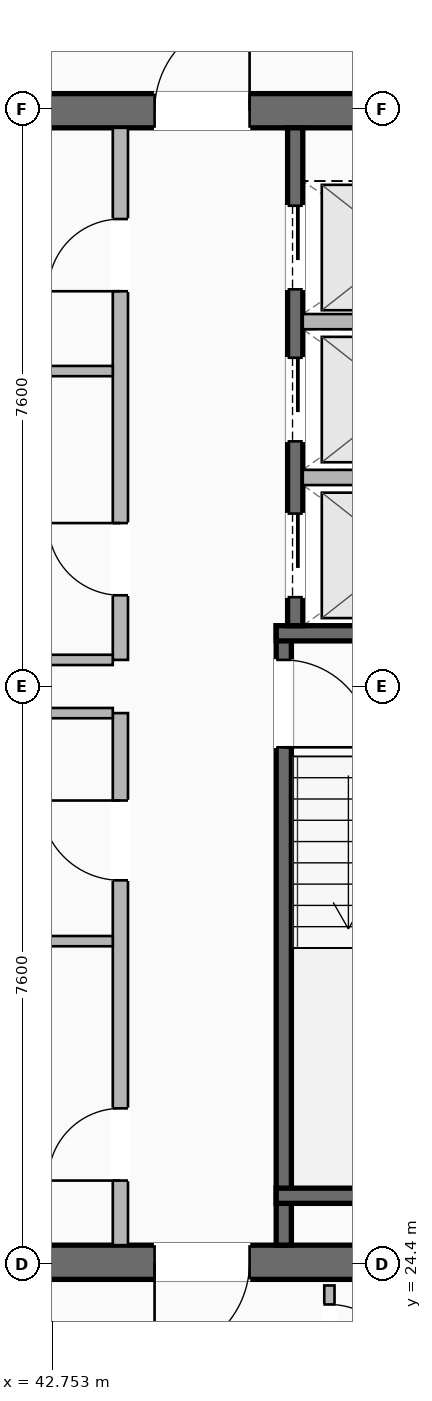
"""IFC4 building model, lengths in metres.
Left out: names, types, materials, properties, quantities, classifications, styles, units other than length and angle.
Written with IfcOpenShell. Run it as: python <this file> out.ifc"""

import sys

from ifc_helpers import new_model, si_unit, direction, frame, frame_2d, origin, place, context, subcontext, project, spatial, rectangle, extrude, element, fill, save


model = new_model("IFC4")
c1 = context("Model", 3, precision=1e-05, world=origin(), true_north=direction((0.0, 1.0)))
c2 = subcontext(c1, "Body", "Model", "MODEL_VIEW")
j1 = project(units=[si_unit("LENGTHUNIT", "METRE"), si_unit("PLANEANGLEUNIT", "RADIAN")], contexts=[c1])
p1 = place(None, origin())
s1 = spatial("IfcSite", under=j1, at=p1, CompositionType="ELEMENT")
p2 = place(p1, origin())
s2 = spatial("IfcBuilding", under=s1, at=p2, CompositionType="ELEMENT")
p3 = place(p2, frame((0.0, 0.0, 266.95)))
s3 = spatial("IfcBuildingStorey", under=s2, at=p3, CompositionType="ELEMENT", Elevation=266.95)
p4 = place(p3, frame((49.35, 24.425, 0.0), z_axis=(0.0, 0.0, 1.0), x_axis=(-1.0, 0.0, 0.0)))
e1 = element("IfcWall", 1, at=p4, inside=s3, PredefinedType="SHEAR", context=c2, shape_type="SweptSolid", body=[
    extrude(rectangle(XDim=14.7, YDim=0.45, at=frame_2d((7.35, 0.0))), origin(), (0.0, 0.0, 1.0), 3.55),
])
p5 = place(p4, frame((9.05, 0.0, 0.0)))
e2 = element("IfcOpeningElement", 2, at=p5, cuts=e1, PredefinedType="OPENING", context=c2, shape_type="SweptSolid", body=[
    extrude(rectangle(XDim=1.25, YDim=2.25, at=frame_2d((0.625, 1.125))), frame((0.0, 0.235, 0.0), z_axis=(0.0, -1.0, 0.0), x_axis=(1.0, 0.0, 0.0)), (0.0, 0.0, 1.0), 0.47),
])
p6 = place(p4, frame((4.0, 0.0, 0.0)))
e3 = element("IfcOpeningElement", 3, at=p6, cuts=e1, PredefinedType="OPENING", context=c2, shape_type="SweptSolid", body=[
    extrude(rectangle(XDim=1.25, YDim=2.25, at=frame_2d((0.625, 1.125))), frame((0.0, 0.235, 0.0), z_axis=(0.0, -1.0, 0.0), x_axis=(1.0, 0.0, 0.0)), (0.0, 0.0, 1.0), 0.47),
])
p7 = place(p3, frame((34.65, 39.575, 0.0), z_axis=(0.0, 0.0, 1.0), x_axis=(1.0, 0.0, 0.0)))
e4 = element("IfcWall", 4, at=p7, inside=s3, PredefinedType="SHEAR", context=c2, shape_type="SweptSolid", body=[
    extrude(rectangle(XDim=14.7, YDim=0.45, at=frame_2d((7.35, 0.0))), origin(), (0.0, 0.0, 1.0), 3.55),
])
p8 = place(p7, frame((4.4, 0.0, 0.0)))
e5 = element("IfcOpeningElement", 5, at=p8, cuts=e4, PredefinedType="OPENING", context=c2, shape_type="SweptSolid", body=[
    extrude(rectangle(XDim=1.25, YDim=2.25, at=frame_2d((0.625, 1.125))), frame((0.0, 0.235, 0.0), z_axis=(0.0, -1.0, 0.0), x_axis=(1.0, 0.0, 0.0)), (0.0, 0.0, 1.0), 0.47),
])
p9 = place(p7, frame((9.45, 0.0, 0.0)))
e6 = element("IfcOpeningElement", 6, at=p9, cuts=e4, PredefinedType="OPENING", context=c2, shape_type="SweptSolid", body=[
    extrude(rectangle(XDim=1.25, YDim=2.25, at=frame_2d((0.625, 1.125))), frame((0.0, 0.235, 0.0), z_axis=(0.0, -1.0, 0.0), x_axis=(1.0, 0.0, 0.0)), (0.0, 0.0, 1.0), 0.47),
])
p10 = place(p3, frame((45.8, 32.8, 0.0), z_axis=(0.0, 0.0, 1.0), x_axis=(0.0, -1.0, 0.0)))
e7 = element("IfcWall", 7, at=p10, inside=s3, PredefinedType="SHEAR", context=c2, shape_type="SweptSolid", body=[
    extrude(rectangle(XDim=8.15, YDim=0.2, at=frame_2d((4.075, 0.0))), origin(), (0.0, 0.0, 1.0), 3.37),
])
p11 = place(p10, frame((0.45, 0.0, 0.0)))
e8 = element("IfcOpeningElement", 8, at=p11, cuts=e7, PredefinedType="OPENING", context=c2, shape_type="SweptSolid", body=[
    extrude(rectangle(XDim=1.15, YDim=2.2, at=frame_2d((0.575, 1.1))), frame((0.0, 0.11, 0.0), z_axis=(0.0, -1.0, 0.0), x_axis=(1.0, 0.0, 0.0)), (0.0, 0.0, 1.0), 0.22),
])
for number, where, z_axis, x_axis in (
    (9, (45.7, 32.7, 0.0), (0.0, 0.0, 1.0), (1.0, 0.0, 0.0)),
    (10, (45.7, 25.3, 0.0), (0.0, 0.0, 1.0), (1.0, 0.0, 0.0)),
):
    element("IfcWall", number, at=place(p3, frame(where, z_axis=z_axis, x_axis=x_axis)), inside=s3, PredefinedType="SHEAR", context=c2, shape_type="SweptSolid", body=[
        extrude(rectangle(XDim=3.65, YDim=0.2, at=frame_2d((1.825, 0.0))), origin(), (0.0, 0.0, 1.0), 3.37),
    ])
p12 = place(p3, frame((45.95, 39.35, 0.0), z_axis=(0.0, 0.0, 1.0), x_axis=(0.0, -1.0, 0.0)))
e11 = element("IfcWall", 11, at=p12, inside=s3, PredefinedType="SHEAR", context=c2, shape_type="SweptSolid", body=[
    extrude(rectangle(XDim=6.55, YDim=0.2, at=frame_2d((3.275, 0.0))), origin(), (0.0, 0.0, 1.0), 3.37),
])
p13 = place(p12, frame((5.075, 0.0, 0.0)))
e12 = element("IfcOpeningElement", 12, at=p13, cuts=e11, PredefinedType="OPENING", context=c2, shape_type="SweptSolid", body=[
    extrude(rectangle(XDim=1.1, YDim=2.2, at=frame_2d((0.55, 1.1))), frame((0.0, 0.11, 0.0), z_axis=(0.0, -1.0, 0.0), x_axis=(1.0, 0.0, 0.0)), (0.0, 0.0, 1.0), 0.22),
])
p14 = place(p12, frame((3.025, 0.0, 0.0)))
e13 = element("IfcOpeningElement", 13, at=p14, cuts=e11, PredefinedType="OPENING", context=c2, shape_type="SweptSolid", body=[
    extrude(rectangle(XDim=1.1, YDim=2.2, at=frame_2d((0.55, 1.1))), frame((0.0, 0.11, 0.0), z_axis=(0.0, -1.0, 0.0), x_axis=(1.0, 0.0, 0.0)), (0.0, 0.0, 1.0), 0.22),
])
p15 = place(p12, frame((1.025, 0.0, 0.0)))
e14 = element("IfcOpeningElement", 14, at=p15, cuts=e11, PredefinedType="OPENING", context=c2, shape_type="SweptSolid", body=[
    extrude(rectangle(XDim=1.1, YDim=2.2, at=frame_2d((0.55, 1.1))), frame((0.0, 0.11, 0.0), z_axis=(0.0, -1.0, 0.0), x_axis=(1.0, 0.0, 0.0)), (0.0, 0.0, 1.0), 0.22),
])
for number, where, z_axis, x_axis in (
    (15, (46.05, 34.75, 0.0), (0.0, 0.0, 1.0), (1.0, 0.0, 0.0)),
    (16, (46.05, 36.8, 0.0), (0.0, 0.0, 1.0), (1.0, 0.0, 0.0)),
):
    element("IfcWall", number, at=place(p3, frame(where, z_axis=z_axis, x_axis=x_axis)), inside=s3, PredefinedType="SOLIDWALL", context=c2, shape_type="SweptSolid", body=[
        extrude(rectangle(XDim=3.3, YDim=0.2, at=frame_2d((1.65, 0.0))), origin(), (0.0, 0.0, 1.0), 3.37),
    ])
p16 = place(p3, frame((43.65, 24.65, 0.0), z_axis=(0.0, 0.0, 1.0), x_axis=(0.0, 1.0, 0.0)))
e17 = element("IfcWall", 17, at=p16, inside=s3, PredefinedType="SOLIDWALL", context=c2, shape_type="SweptSolid", body=[
    extrude(rectangle(XDim=7.0, YDim=0.2, at=frame_2d((3.5, 0.0))), origin(), (0.0, 0.0, 1.0), 2.723),
])
p17 = place(p16, frame((0.85, 0.0, 0.0)))
e18 = element("IfcOpeningElement", 18, at=p17, cuts=e17, PredefinedType="OPENING", context=c2, shape_type="SweptSolid", body=[
    extrude(rectangle(XDim=0.95, YDim=2.05, at=frame_2d((0.475, 1.025))), frame((0.0, 0.11, 0.0), z_axis=(0.0, -1.0, 0.0), x_axis=(1.0, 0.0, 0.0)), (0.0, 0.0, 1.0), 0.22),
])
p18 = place(p16, frame((4.8, 0.0, 0.0)))
e19 = element("IfcOpeningElement", 19, at=p18, cuts=e17, PredefinedType="OPENING", context=c2, shape_type="SweptSolid", body=[
    extrude(rectangle(XDim=1.05, YDim=2.2, at=frame_2d((0.525, 1.1))), frame((0.0, 0.11, 0.0), z_axis=(0.0, -1.0, 0.0), x_axis=(1.0, 0.0, 0.0)), (0.0, 0.0, 1.0), 0.22),
])
for number, where, z_axis, x_axis in (
    (20, (41.67, 31.65, 0.0), (0.0, 0.0, 1.0), (1.0, 0.0, 0.0)),
    (21, (41.67, 28.65, 0.0), (0.0, 0.0, 1.0), (1.0, 0.0, 0.0)),
):
    element("IfcWall", number, at=place(p3, frame(where, z_axis=z_axis, x_axis=x_axis)), inside=s3, PredefinedType="PARTITIONING", context=c2, shape_type="SweptSolid", body=[
        extrude(rectangle(XDim=1.88, YDim=0.135, at=frame_2d((0.94, 0.0))), origin(), (0.0, 0.0, 1.0), 2.723),
    ])
p19 = place(p3, frame((43.65, 32.35, 0.0), z_axis=(0.0, 0.0, 1.0), x_axis=(0.0, 1.0, 0.0)))
e22 = element("IfcWall", 22, at=p19, inside=s3, PredefinedType="SOLIDWALL", context=c2, shape_type="SweptSolid", body=[
    extrude(rectangle(XDim=7.0, YDim=0.2, at=frame_2d((3.5, 0.0))), origin(), (0.0, 0.0, 1.0), 2.723),
])
p20 = place(p19, frame((0.85, 0.0, 0.0)))
e23 = element("IfcOpeningElement", 23, at=p20, cuts=e22, PredefinedType="OPENING", context=c2, shape_type="SweptSolid", body=[
    extrude(rectangle(XDim=0.95, YDim=2.05, at=frame_2d((0.475, 1.025))), frame((0.0, 0.11, 0.0), z_axis=(0.0, -1.0, 0.0), x_axis=(1.0, 0.0, 0.0)), (0.0, 0.0, 1.0), 0.22),
])
p21 = place(p19, frame((4.85, 0.0, 0.0)))
e24 = element("IfcOpeningElement", 24, at=p21, cuts=e22, PredefinedType="OPENING", context=c2, shape_type="SweptSolid", body=[
    extrude(rectangle(XDim=0.95, YDim=2.05, at=frame_2d((0.475, 1.025))), frame((0.0, 0.11, 0.0), z_axis=(0.0, -1.0, 0.0), x_axis=(1.0, 0.0, 0.0)), (0.0, 0.0, 1.0), 0.22),
])
for number, where, z_axis, x_axis in (
    (25, (41.67, 32.35, 0.0), (0.0, 0.0, 1.0), (1.0, 0.0, 0.0)),
    (26, (41.67, 36.15, 0.0), (0.0, 0.0, 1.0), (1.0, 0.0, 0.0)),
):
    element("IfcWall", number, at=place(p3, frame(where, z_axis=z_axis, x_axis=x_axis)), inside=s3, PredefinedType="PARTITIONING", context=c2, shape_type="SweptSolid", body=[
        extrude(rectangle(XDim=1.88, YDim=0.135, at=frame_2d((0.94, 0.0))), origin(), (0.0, 0.0, 1.0), 2.723),
    ])
p22 = place(p3, frame((46.4, 24.12, 0.0), z_axis=(0.0, 0.0, 1.0), x_axis=(0.0, -1.0, 0.0)))
e27 = element("IfcWall", 27, at=p22, inside=s3, PredefinedType="PARTITIONING", context=c2, shape_type="SweptSolid", body=[
    extrude(rectangle(XDim=1.49, YDim=0.135, at=frame_2d((0.745, 0.0))), origin(), (0.0, 0.0, 1.0), 2.723),
])
p23 = place(p22, frame((0.25, 0.0, 0.0)))
e28 = element("IfcOpeningElement", 28, at=p23, cuts=e27, PredefinedType="OPENING", context=c2, shape_type="SweptSolid", body=[
    extrude(rectangle(XDim=0.95, YDim=2.05, at=frame_2d((0.475, 1.025))), frame((0.0, 0.077, 0.0), z_axis=(0.0, -1.0, 0.0), x_axis=(1.0, 0.0, 0.0)), (0.0, 0.0, 1.0), 0.155),
])
p24 = place(p9, origin())
e29 = element("IfcDoor", 29, at=p24, inside=s3, OperationType="SINGLE_SWING_RIGHT", PredefinedType="DOOR", context=c2, shape_type="SweptSolid", body=[
    extrude(rectangle(XDim=1.25, YDim=2.25, at=frame_2d((0.625, 1.125))), frame((0.0, 0.025, 0.0), z_axis=(0.0, -1.0, 0.0), x_axis=(1.0, 0.0, 0.0)), (0.0, 0.0, 1.0), 0.05),
])
fill(e6, e29)
p25 = place(p6, origin())
e30 = element("IfcDoor", 30, at=p25, inside=s3, OperationType="SINGLE_SWING_RIGHT", PredefinedType="DOOR", context=c2, shape_type="SweptSolid", body=[
    extrude(rectangle(XDim=1.25, YDim=2.25, at=frame_2d((0.625, 1.125))), frame((0.0, 0.025, 0.0), z_axis=(0.0, -1.0, 0.0), x_axis=(1.0, 0.0, 0.0)), (0.0, 0.0, 1.0), 0.05),
])
fill(e3, e30)
p26 = place(p11, origin())
e31 = element("IfcDoor", 31, at=p26, inside=s3, OperationType="SINGLE_SWING_RIGHT", PredefinedType="DOOR", context=c2, shape_type="SweptSolid", body=[
    extrude(rectangle(XDim=1.15, YDim=2.2, at=frame_2d((0.575, 1.1))), frame((0.0, 0.025, 0.0), z_axis=(0.0, -1.0, 0.0), x_axis=(1.0, 0.0, 0.0)), (0.0, 0.0, 1.0), 0.05),
])
fill(e8, e31)
p27 = place(p17, origin())
e32 = element("IfcDoor", 32, at=p27, inside=s3, OperationType="SINGLE_SWING_LEFT", PredefinedType="DOOR", context=c2, shape_type="SweptSolid", body=[
    extrude(rectangle(XDim=0.95, YDim=2.05, at=frame_2d((0.475, 1.025))), frame((0.0, 0.025, 0.0), z_axis=(0.0, -1.0, 0.0), x_axis=(1.0, 0.0, 0.0)), (0.0, 0.0, 1.0), 0.05),
])
fill(e18, e32)
p28 = place(p18, origin())
e33 = element("IfcDoor", 33, at=p28, inside=s3, OperationType="SINGLE_SWING_RIGHT", PredefinedType="DOOR", context=c2, shape_type="SweptSolid", body=[
    extrude(rectangle(XDim=1.05, YDim=2.2, at=frame_2d((0.525, 1.1))), frame((0.0, 0.025, 0.0), z_axis=(0.0, -1.0, 0.0), x_axis=(1.0, 0.0, 0.0)), (0.0, 0.0, 1.0), 0.05),
])
fill(e19, e33)
p29 = place(p20, origin())
e34 = element("IfcDoor", 34, at=p29, inside=s3, OperationType="SINGLE_SWING_RIGHT", PredefinedType="DOOR", context=c2, shape_type="SweptSolid", body=[
    extrude(rectangle(XDim=0.95, YDim=2.05, at=frame_2d((0.475, 1.025))), frame((0.0, 0.025, 0.0), z_axis=(0.0, -1.0, 0.0), x_axis=(1.0, 0.0, 0.0)), (0.0, 0.0, 1.0), 0.05),
])
fill(e23, e34)
p30 = place(p21, origin())
e35 = element("IfcDoor", 35, at=p30, inside=s3, OperationType="SINGLE_SWING_LEFT", PredefinedType="DOOR", context=c2, shape_type="SweptSolid", body=[
    extrude(rectangle(XDim=0.95, YDim=2.05, at=frame_2d((0.475, 1.025))), frame((0.0, 0.025, 0.0), z_axis=(0.0, -1.0, 0.0), x_axis=(1.0, 0.0, 0.0)), (0.0, 0.0, 1.0), 0.05),
])
fill(e24, e35)
p31 = place(p23, origin())
e36 = element("IfcDoor", 36, at=p31, inside=s3, OperationType="SINGLE_SWING_RIGHT", PredefinedType="DOOR", context=c2, shape_type="SweptSolid", body=[
    extrude(rectangle(XDim=0.95, YDim=2.05, at=frame_2d((0.475, 1.025))), frame((0.0, 0.025, 0.0), z_axis=(0.0, -1.0, 0.0), x_axis=(1.0, 0.0, 0.0)), (0.0, 0.0, 1.0), 0.05),
])
fill(e28, e36)
p32 = place(p13, origin())
e37 = element("IfcDoor", 37, at=p32, inside=s3, OperationType="SLIDING_TO_LEFT", PredefinedType="DOOR", context=c2, shape_type="SweptSolid", body=[
    extrude(rectangle(XDim=1.1, YDim=2.2, at=frame_2d((0.55, 1.1))), frame((0.0, 0.025, 0.0), z_axis=(0.0, -1.0, 0.0), x_axis=(1.0, 0.0, 0.0)), (0.0, 0.0, 1.0), 0.05),
])
fill(e12, e37)
p33 = place(p14, origin())
e38 = element("IfcDoor", 38, at=p33, inside=s3, OperationType="SLIDING_TO_LEFT", PredefinedType="DOOR", context=c2, shape_type="SweptSolid", body=[
    extrude(rectangle(XDim=1.1, YDim=2.2, at=frame_2d((0.55, 1.1))), frame((0.0, 0.025, 0.0), z_axis=(0.0, -1.0, 0.0), x_axis=(1.0, 0.0, 0.0)), (0.0, 0.0, 1.0), 0.05),
])
fill(e13, e38)
p34 = place(p15, origin())
e39 = element("IfcDoor", 39, at=p34, inside=s3, OperationType="SLIDING_TO_LEFT", PredefinedType="DOOR", context=c2, shape_type="SweptSolid", body=[
    extrude(rectangle(XDim=1.1, YDim=2.2, at=frame_2d((0.55, 1.1))), frame((0.0, 0.025, 0.0), z_axis=(0.0, -1.0, 0.0), x_axis=(1.0, 0.0, 0.0)), (0.0, 0.0, 1.0), 0.05),
])
fill(e14, e39)
save(model, sys.argv[1])
